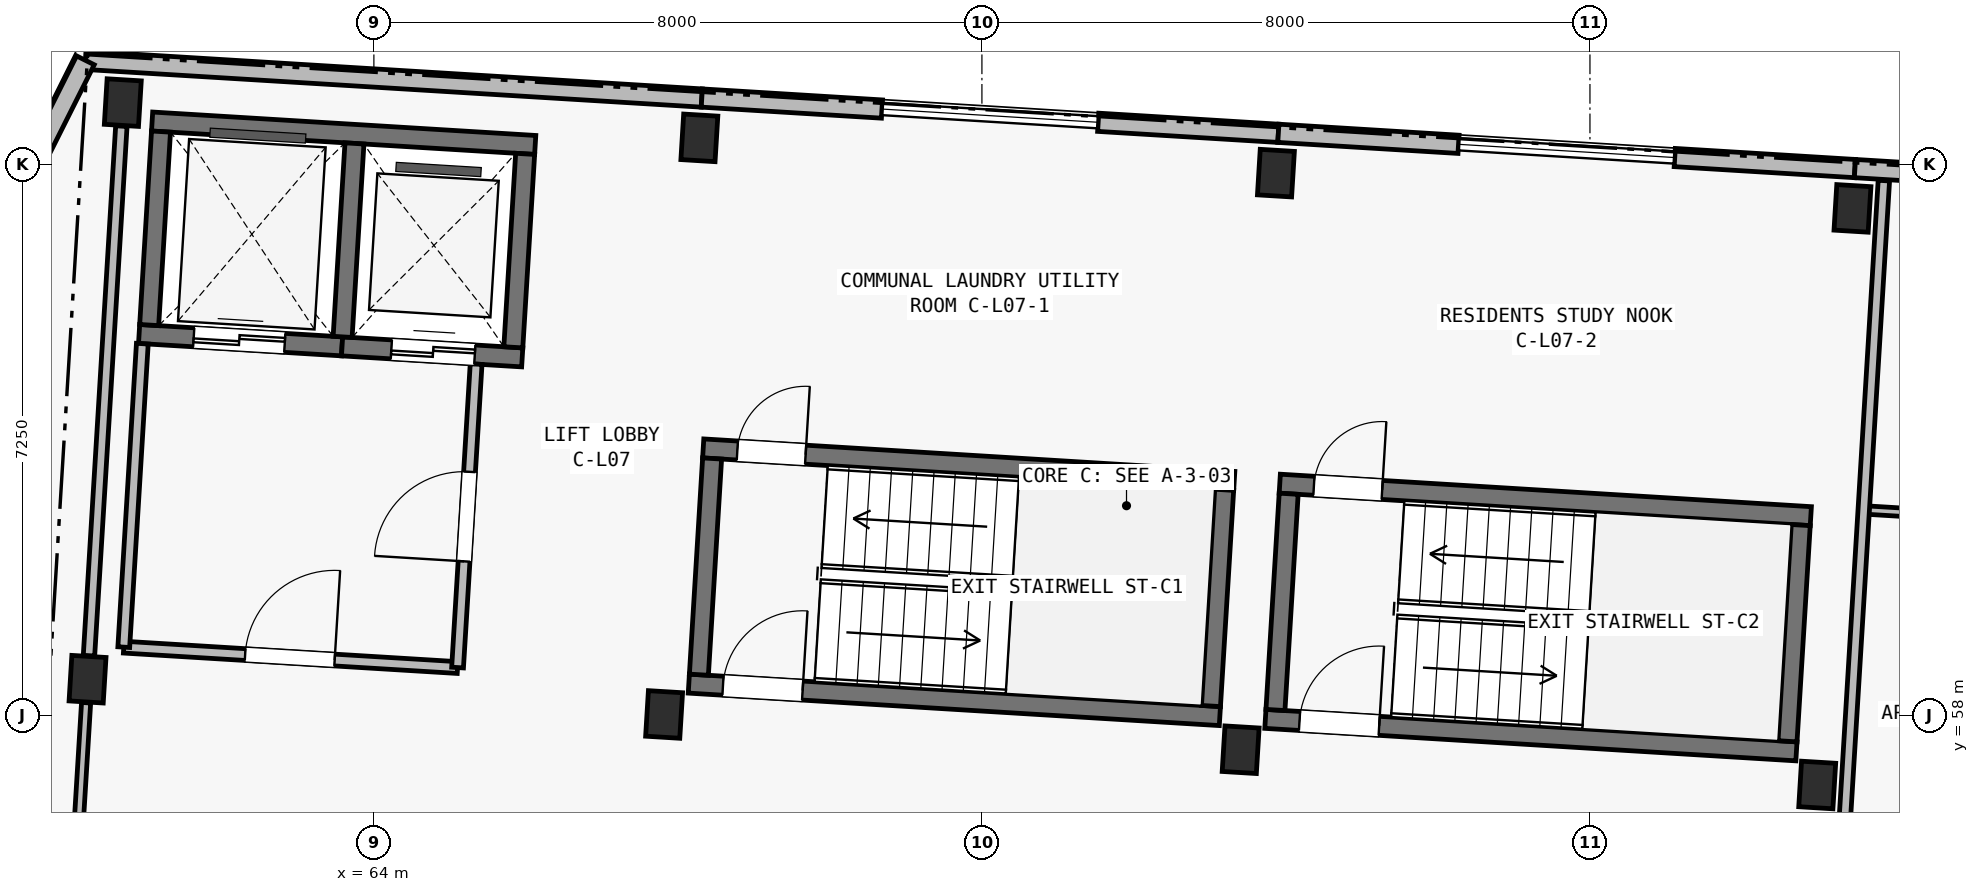
"""IFC4 building model, lengths in metres.
Left out: names, types, materials, properties, quantities, classifications, styles, units other than length and angle.
Written with IfcOpenShell. Run it as: python <this file> out.ifc"""

import sys

from ifc_helpers import new_model, si_unit, direction, frame, frame_2d, origin, origin_2d, place, context, subcontext, project, spatial, rectangle, extrude, element, fill, save


model = new_model("IFC4")
c1 = context("Model", 3, precision=1e-05, world=origin(), true_north=direction((0.0, 1.0)))
c2 = subcontext(c1, "Body", "Model", "MODEL_VIEW")
j1 = project(units=[si_unit("LENGTHUNIT", "METRE"), si_unit("PLANEANGLEUNIT", "RADIAN")], contexts=[c1])
p1 = place(None, origin())
s1 = spatial("IfcSite", under=j1, at=p1, CompositionType="ELEMENT")
p2 = place(p1, origin())
s2 = spatial("IfcBuilding", under=s1, at=p2, CompositionType="ELEMENT")
p3 = place(p2, frame((0.0, 0.0, 24.65)))
s3 = spatial("IfcBuildingStorey", under=s2, at=p3, CompositionType="ELEMENT", Elevation=24.65)
for number, where, z_axis, x_axis in (
    (1, (60.233, 58.478, 0.0), (0.0, 0.0, 1.0), (0.998, -0.061, 0.0)),
    (2, (60.697, 66.063, 0.0), (0.0, 0.0, 1.0), (0.998, -0.061, 0.0)),
    (3, (67.818, 58.014, 0.0), (0.0, 0.0, 1.0), (0.998, -0.061, 0.0)),
    (4, (68.282, 65.599, 0.0), (0.0, 0.0, 1.0), (0.998, -0.061, 0.0)),
    (5, (75.404, 57.55, 0.0), (0.0, 0.0, 1.0), (0.998, -0.061, 0.0)),
    (6, (75.868, 65.135, 0.0), (0.0, 0.0, 1.0), (0.998, -0.061, 0.0)),
    (7, (82.99, 57.086, 0.0), (0.0, 0.0, 1.0), (0.998, -0.061, 0.0)),
    (8, (83.454, 64.672, 0.0), (0.0, 0.0, 1.0), (0.998, -0.061, 0.0)),
):
    element("IfcColumn", number, at=place(p3, frame(where, z_axis=z_axis, x_axis=x_axis)), inside=s3, PredefinedType="COLUMN", context=c2, shape_type="SweptSolid", body=[
        extrude(rectangle(XDim=0.45, YDim=0.6, at=origin_2d()), origin(), (0.0, 0.0, 1.0), 3.25),
    ])
p4 = place(p3, frame((61.082, 65.814, 0.0), z_axis=(0.0, 0.0, 1.0), x_axis=(0.998134101522, -0.061059932685, 0.0)))
e9 = element("IfcWall", 9, at=p4, inside=s3, PredefinedType="SHEAR", context=c2, shape_type="SweptSolid", body=[
    extrude(rectangle(XDim=5.05, YDim=0.25, at=frame_2d((2.525, 0.0))), origin(), (0.0, 0.0, 1.0), 3.25),
])
p5 = place(p3, frame((60.911, 63.02, 0.0), z_axis=(0.0, 0.0, 1.0), x_axis=(0.998134099905, -0.061059959111, 0.0)))
e10 = element("IfcWall", 10, at=p5, inside=s3, PredefinedType="SHEAR", context=c2, shape_type="SweptSolid", body=[
    extrude(rectangle(XDim=2.675, YDim=0.25, at=frame_2d((1.337, 0.0))), origin(), (0.0, 0.0, 1.0), 3.25),
])
p6 = place(p5, frame((0.72, 0.0, 0.0)))
e11 = element("IfcOpeningElement", 11, at=p6, cuts=e10, PredefinedType="OPENING", context=c2, shape_type="SweptSolid", body=[
    extrude(rectangle(XDim=1.2, YDim=2.2, at=frame_2d((0.6, 1.1))), frame((0.0, 0.14, 0.0), z_axis=(0.0, -1.0, 0.0), x_axis=(1.0, 0.0, 0.0)), (0.0, 0.0, 1.0), 0.28),
])
p7 = place(p3, frame((63.581, 62.856, 0.0), z_axis=(0.0, 0.0, 1.0), x_axis=(0.998134103342, -0.061059902923, 0.0)))
e12 = element("IfcWall", 12, at=p7, inside=s3, PredefinedType="SHEAR", context=c2, shape_type="SweptSolid", body=[
    extrude(rectangle(XDim=2.375, YDim=0.25, at=frame_2d((1.188, 0.0))), origin(), (0.0, 0.0, 1.0), 3.25),
])
p8 = place(p7, frame((0.65, 0.0, 0.0)))
e13 = element("IfcOpeningElement", 13, at=p8, cuts=e12, PredefinedType="OPENING", context=c2, shape_type="SweptSolid", body=[
    extrude(rectangle(XDim=1.1, YDim=2.15, at=frame_2d((0.55, 1.075))), frame((0.0, 0.14, 0.0), z_axis=(0.0, -1.0, 0.0), x_axis=(1.0, 0.0, 0.0)), (0.0, 0.0, 1.0), 0.28),
])
p9 = place(p3, frame((61.043, 63.137, 0.0), z_axis=(0.0, 0.0, 1.0), x_axis=(0.061078919587, 0.998132939834, 0.0)))
e14 = element("IfcWall", 14, at=p9, inside=s3, PredefinedType="SHEAR", context=c2, shape_type="SweptSolid", body=[
    extrude(rectangle(XDim=2.55, YDim=0.25, at=frame_2d((1.275, 0.0))), origin(), (0.0, 0.0, 1.0), 3.25),
])
p10 = place(p3, frame((63.589, 62.981, 0.0), z_axis=(0.0, 0.0, 1.0), x_axis=(0.060989368901, 0.998138415692, 0.0)))
e15 = element("IfcWall", 15, at=p10, inside=s3, PredefinedType="SHEAR", context=c2, shape_type="SweptSolid", body=[
    extrude(rectangle(XDim=2.55, YDim=0.25, at=frame_2d((1.275, 0.0))), origin(), (0.0, 0.0, 1.0), 3.25),
])
p11 = place(p3, frame((65.834, 62.844, 0.0), z_axis=(0.0, 0.0, 1.0), x_axis=(0.061084756616, 0.998132582631, 0.0)))
e16 = element("IfcWall", 16, at=p11, inside=s3, PredefinedType="SHEAR", context=c2, shape_type="SweptSolid", body=[
    extrude(rectangle(XDim=2.55, YDim=0.25, at=frame_2d((1.275, 0.0))), origin(), (0.0, 0.0, 1.0), 3.25),
])
p12 = place(p3, frame((68.333, 61.514, 0.0), z_axis=(0.0, 0.0, 1.0), x_axis=(0.998135676081, -0.061034188237, 0.0)))
e17 = element("IfcWall", 17, at=p12, inside=s3, PredefinedType="SHEAR", context=c2, shape_type="SweptSolid", body=[
    extrude(rectangle(XDim=7.0, YDim=0.25, at=frame_2d((3.5, 0.0))), origin(), (0.0, 0.0, 1.0), 3.25),
])
p13 = place(p12, frame((0.45, 0.0, 0.0)))
e18 = element("IfcOpeningElement", 18, at=p13, cuts=e17, PredefinedType="OPENING", context=c2, shape_type="SweptSolid", body=[
    extrude(rectangle(XDim=0.9, YDim=2.1, at=frame_2d((0.45, 1.05))), frame((0.0, 0.14, 0.0), z_axis=(0.0, -1.0, 0.0), x_axis=(1.0, 0.0, 0.0)), (0.0, 0.0, 1.0), 0.28),
])
p14 = place(p3, frame((68.144, 58.419, 0.0), z_axis=(0.0, 0.0, 1.0), x_axis=(0.998135546153, -0.061036313012, 0.0)))
e19 = element("IfcWall", 19, at=p14, inside=s3, PredefinedType="SHEAR", context=c2, shape_type="SweptSolid", body=[
    extrude(rectangle(XDim=7.0, YDim=0.25, at=frame_2d((3.5, 0.0))), origin(), (0.0, 0.0, 1.0), 3.25),
])
p15 = place(p14, frame((0.45, 0.0, 0.0)))
e20 = element("IfcOpeningElement", 20, at=p15, cuts=e19, PredefinedType="OPENING", context=c2, shape_type="SweptSolid", body=[
    extrude(rectangle(XDim=1.05, YDim=2.15, at=frame_2d((0.525, 1.075))), frame((0.0, 0.14, 0.0), z_axis=(0.0, -1.0, 0.0), x_axis=(1.0, 0.0, 0.0)), (0.0, 0.0, 1.0), 0.28),
])
for number, where, z_axis, x_axis in (
    (21, (68.276, 58.537, 0.0), (0.0, 0.0, 1.0), (0.061, 0.998, 0.0)),
    (22, (75.014, 58.125, 0.0), (0.0, 0.0, 1.0), (0.061, 0.998, 0.0)),
):
    element("IfcWall", number, at=place(p3, frame(where, z_axis=z_axis, x_axis=x_axis)), inside=s3, PredefinedType="SHEAR", context=c2, shape_type="SweptSolid", body=[
        extrude(rectangle(XDim=2.85, YDim=0.25, at=frame_2d((1.425, 0.0))), origin(), (0.0, 0.0, 1.0), 3.25),
    ])
p16 = place(p3, frame((75.919, 61.05, 0.0), z_axis=(0.0, 0.0, 1.0), x_axis=(0.998135546153, -0.061036313012, 0.0)))
e23 = element("IfcWall", 23, at=p16, inside=s3, PredefinedType="SHEAR", context=c2, shape_type="SweptSolid", body=[
    extrude(rectangle(XDim=7.0, YDim=0.25, at=frame_2d((3.5, 0.0))), origin(), (0.0, 0.0, 1.0), 3.25),
])
p17 = place(p16, frame((0.45, 0.0, 0.0)))
e24 = element("IfcOpeningElement", 24, at=p17, cuts=e23, PredefinedType="OPENING", context=c2, shape_type="SweptSolid", body=[
    extrude(rectangle(XDim=0.9, YDim=2.1, at=frame_2d((0.45, 1.05))), frame((0.0, 0.14, 0.0), z_axis=(0.0, -1.0, 0.0), x_axis=(1.0, 0.0, 0.0)), (0.0, 0.0, 1.0), 0.28),
])
p18 = place(p3, frame((75.73, 57.956, 0.0), z_axis=(0.0, 0.0, 1.0), x_axis=(0.998135546153, -0.061036313012, 0.0)))
e25 = element("IfcWall", 25, at=p18, inside=s3, PredefinedType="SHEAR", context=c2, shape_type="SweptSolid", body=[
    extrude(rectangle(XDim=7.0, YDim=0.25, at=frame_2d((3.5, 0.0))), origin(), (0.0, 0.0, 1.0), 3.25),
])
p19 = place(p18, frame((0.45, 0.0, 0.0)))
e26 = element("IfcOpeningElement", 26, at=p19, cuts=e25, PredefinedType="OPENING", context=c2, shape_type="SweptSolid", body=[
    extrude(rectangle(XDim=1.05, YDim=2.15, at=frame_2d((0.525, 1.075))), frame((0.0, 0.14, 0.0), z_axis=(0.0, -1.0, 0.0), x_axis=(1.0, 0.0, 0.0)), (0.0, 0.0, 1.0), 0.28),
])
for number, where, z_axis, x_axis in (
    (27, (75.862, 58.073, 0.0), (0.0, 0.0, 1.0), (0.061, 0.998, 0.0)),
    (28, (82.599, 57.661, 0.0), (0.0, 0.0, 1.0), (0.061, 0.998, 0.0)),
):
    element("IfcWall", number, at=place(p3, frame(where, z_axis=z_axis, x_axis=x_axis)), inside=s3, PredefinedType="SHEAR", context=c2, shape_type="SweptSolid", body=[
        extrude(rectangle(XDim=2.85, YDim=0.25, at=frame_2d((1.425, 0.0))), origin(), (0.0, 0.0, 1.0), 3.25),
    ])
p20 = place(p3, frame((60.205, 66.62, 0.0), z_axis=(0.0, 0.0, 1.0), x_axis=(0.998134248939, -0.061057522844, 0.0)))
e29 = element("IfcWall", 29, at=p20, inside=s3, PredefinedType="SOLIDWALL", context=c2, shape_type="SweptSolid", body=[
    extrude(rectangle(XDim=8.125, YDim=0.24, at=frame_2d((4.062, 0.0))), origin(), (0.0, 0.0, 1.0), 3.0),
])
p21 = place(p3, frame((68.314, 66.124, 0.0), z_axis=(0.0, 0.0, 1.0), x_axis=(0.998134103342, -0.061059902923, 0.0)))
e30 = element("IfcWall", 30, at=p21, inside=s3, PredefinedType="SOLIDWALL", context=c2, shape_type="SweptSolid", body=[
    extrude(rectangle(XDim=2.375, YDim=0.24, at=frame_2d((1.188, 0.0))), origin(), (0.0, 0.0, 1.0), 3.0),
])
p22 = place(p3, frame((73.53, 65.804, 0.0), z_axis=(0.0, 0.0, 1.0), x_axis=(0.998133720034, -0.061066168473, 0.0)))
e31 = element("IfcWall", 31, at=p22, inside=s3, PredefinedType="SOLIDWALL", context=c2, shape_type="SweptSolid", body=[
    extrude(rectangle(XDim=2.375, YDim=0.24, at=frame_2d((1.188, 0.0))), origin(), (0.0, 0.0, 1.0), 3.0),
])
for number, where, z_axis, x_axis in (
    (32, (75.9, 65.659, 0.0), (0.0, 0.0, 1.0), (0.998, -0.061, 0.0)),
    (33, (81.115, 65.341, 0.0), (0.0, 0.0, 1.0), (0.998, -0.061, 0.0)),
):
    element("IfcWall", number, at=place(p3, frame(where, z_axis=z_axis, x_axis=x_axis)), inside=s3, PredefinedType="SOLIDWALL", context=c2, shape_type="SweptSolid", body=[
        extrude(rectangle(XDim=2.375, YDim=0.24, at=frame_2d((1.188, 0.0))), origin(), (0.0, 0.0, 1.0), 3.0),
    ])
p23 = place(p3, frame((83.486, 65.196, 0.0), z_axis=(0.0, 0.0, 1.0), x_axis=(0.998135669243, -0.061034300063, 0.0)))
e34 = element("IfcWall", 34, at=p23, inside=s3, PredefinedType="SOLIDWALL", context=c2, shape_type="SweptSolid", body=[
    extrude(rectangle(XDim=7.6, YDim=0.24, at=frame_2d((3.8, 0.0))), origin(), (0.0, 0.0, 1.0), 3.0),
])
p24 = place(p23, frame((1.424, 0.0, 0.44)))
e35 = element("IfcOpeningElement", 35, at=p24, cuts=e34, PredefinedType="OPENING", context=c2, shape_type="SweptSolid", body=[
    extrude(rectangle(XDim=0.64, YDim=2.18, at=frame_2d((0.32, 1.09))), frame((0.0, 0.135, 0.0), z_axis=(0.0, -1.0, 0.0), x_axis=(1.0, 0.0, 0.0)), (0.0, 0.0, 1.0), 0.27),
])
p25 = place(p23, frame((5.935, 0.0, 0.5)))
e36 = element("IfcOpeningElement", 36, at=p25, cuts=e34, PredefinedType="OPENING", context=c2, shape_type="SweptSolid", body=[
    extrude(rectangle(XDim=0.72, YDim=2.16, at=frame_2d((0.36, 1.08))), frame((0.0, 0.135, 0.0), z_axis=(0.0, -1.0, 0.0), x_axis=(1.0, 0.0, 0.0)), (0.0, 0.0, 1.0), 0.27),
])
p26 = place(p3, frame((51.654, 49.585, 0.0), z_axis=(0.0, 0.0, 1.0), x_axis=(0.448621989068, 0.893721607059, 0.0)))
e37 = element("IfcWall", 37, at=p26, inside=s3, PredefinedType="SOLIDWALL", context=c2, shape_type="SweptSolid", body=[
    extrude(rectangle(XDim=19.061, YDim=0.26, at=frame_2d((9.53, 0.0))), origin(), (0.0, 0.0, 1.0), 3.0),
])
p27 = place(p26, frame((2.99, 0.0, 0.52)))
e38 = element("IfcOpeningElement", 38, at=p27, cuts=e37, PredefinedType="OPENING", context=c2, shape_type="SweptSolid", body=[
    extrude(rectangle(XDim=0.64, YDim=2.18, at=frame_2d((0.32, 1.09))), frame((0.0, 0.145, 0.0), z_axis=(0.0, -1.0, 0.0), x_axis=(1.0, 0.0, 0.0)), (0.0, 0.0, 1.0), 0.29),
])
p28 = place(p26, frame((15.65, 0.0, 0.45)))
e39 = element("IfcOpeningElement", 39, at=p28, cuts=e37, PredefinedType="OPENING", context=c2, shape_type="SweptSolid", body=[
    extrude(rectangle(XDim=0.78, YDim=2.2, at=frame_2d((0.39, 1.1))), frame((0.0, 0.145, 0.0), z_axis=(0.0, -1.0, 0.0), x_axis=(1.0, 0.0, 0.0)), (0.0, 0.0, 1.0), 0.29),
])
p29 = place(p3, frame((60.709, 58.899, 0.0), z_axis=(0.0, 0.0, 1.0), x_axis=(0.998132276607, -0.061089756882, 0.0)))
e40 = element("IfcWall", 40, at=p29, inside=s3, PredefinedType="PARTITIONING", context=c2, shape_type="SweptSolid", body=[
    extrude(rectangle(XDim=4.4, YDim=0.155, at=frame_2d((2.2, 0.0))), origin(), (0.0, 0.0, 1.0), 2.97),
])
p30 = place(p29, frame((1.6, 0.0, 0.0)))
e41 = element("IfcOpeningElement", 41, at=p30, cuts=e40, PredefinedType="OPENING", context=c2, shape_type="SweptSolid", body=[
    extrude(rectangle(XDim=1.18, YDim=2.15, at=frame_2d((0.59, 1.075))), frame((0.0, 0.093, 0.0), z_axis=(0.0, -1.0, 0.0), x_axis=(1.0, 0.0, 0.0)), (0.0, 0.0, 1.0), 0.185),
])
p31 = place(p3, frame((60.709, 58.899, 0.0), z_axis=(0.0, 0.0, 1.0), x_axis=(0.061036844229, 0.998135513669, 0.0)))
e42 = element("IfcWall", 42, at=p31, inside=s3, PredefinedType="PARTITIONING", context=c2, shape_type="SweptSolid", body=[
    extrude(rectangle(XDim=4.0, YDim=0.155, at=frame_2d((2.0, 0.0))), origin(), (0.0, 0.0, 1.0), 2.97),
])
p32 = place(p3, frame((65.101, 58.631, 0.0), z_axis=(0.0, 0.0, 1.0), x_axis=(0.061033125904, 0.99813574104, 0.0)))
e43 = element("IfcWall", 43, at=p32, inside=s3, PredefinedType="PARTITIONING", context=c2, shape_type="SweptSolid", body=[
    extrude(rectangle(XDim=4.0, YDim=0.155, at=frame_2d((2.0, 0.0))), origin(), (0.0, 0.0, 1.0), 2.97),
])
p33 = place(p32, frame((1.4, 0.0, 0.0)))
e44 = element("IfcOpeningElement", 44, at=p33, cuts=e43, PredefinedType="OPENING", context=c2, shape_type="SweptSolid", body=[
    extrude(rectangle(XDim=1.18, YDim=2.15, at=frame_2d((0.59, 1.075))), frame((0.0, 0.093, 0.0), z_axis=(0.0, -1.0, 0.0), x_axis=(1.0, 0.0, 0.0)), (0.0, 0.0, 1.0), 0.185),
])
p34 = place(p3, frame((59.983, 54.395, 0.0), z_axis=(0.0, 0.0, 1.0), x_axis=(0.061035211258, 0.998135613525, 0.0)))
e45 = element("IfcWall", 45, at=p34, inside=s3, PredefinedType="PARTITIONING", context=c2, shape_type="SweptSolid", body=[
    extrude(rectangle(XDim=3.78, YDim=0.12, at=frame_2d((1.89, 0.0))), origin(), (0.0, 0.0, 1.0), 2.5),
])
p35 = place(p34, frame((1.35, 0.0, 0.0)))
e46 = element("IfcOpeningElement", 46, at=p35, cuts=e45, PredefinedType="OPENING", context=c2, shape_type="SweptSolid", body=[
    extrude(rectangle(XDim=0.9, YDim=2.1, at=frame_2d((0.45, 1.05))), frame((0.0, 0.075, 0.0), z_axis=(0.0, -1.0, 0.0), x_axis=(1.0, 0.0, 0.0)), (0.0, 0.0, 1.0), 0.15),
])
p36 = place(p3, frame((60.251, 58.787, 0.0), z_axis=(0.0, 0.0, 1.0), x_axis=(0.061071659957, 0.998133384047, 0.0)))
e47 = element("IfcWall", 47, at=p36, inside=s3, PredefinedType="PARTITIONING", context=c2, shape_type="SweptSolid", body=[
    extrude(rectangle(XDim=6.98, YDim=0.15, at=frame_2d((3.49, 0.0))), origin(), (0.0, 0.0, 1.0), 2.5),
])
p37 = place(p3, frame((83.602, 60.705, 0.0), z_axis=(0.0, 0.0, 1.0), x_axis=(0.998133617109, -0.061067850767, 0.0)))
e48 = element("IfcWall", 48, at=p37, inside=s3, PredefinedType="PARTITIONING", context=c2, shape_type="SweptSolid", body=[
    extrude(rectangle(XDim=3.41, YDim=0.11, at=frame_2d((1.705, 0.0))), origin(), (0.0, 0.0, 1.0), 2.97),
])
p38 = place(p37, frame((1.255, 0.0, 0.0)))
e49 = element("IfcOpeningElement", 49, at=p38, cuts=e48, PredefinedType="OPENING", context=c2, shape_type="SweptSolid", body=[
    extrude(rectangle(XDim=0.9, YDim=2.1, at=frame_2d((0.45, 1.05))), frame((0.0, 0.07, 0.0), z_axis=(0.0, -1.0, 0.0), x_axis=(1.0, 0.0, 0.0)), (0.0, 0.0, 1.0), 0.14),
])
p39 = place(p3, frame((83.265, 55.185, 0.0), z_axis=(0.0, 0.0, 1.0), x_axis=(0.061046193261, 0.998134941923, 0.0)))
e50 = element("IfcWall", 50, at=p39, inside=s3, PredefinedType="PARTITIONING", context=c2, shape_type="SweptSolid", body=[
    extrude(rectangle(XDim=9.87, YDim=0.15, at=frame_2d((4.935, 0.0))), origin(), (0.0, 0.0, 1.0), 2.97),
])
p40 = place(p30, origin())
e51 = element("IfcDoor", 51, at=p40, inside=s3, OperationType="SINGLE_SWING_RIGHT", PredefinedType="DOOR", context=c2, shape_type="SweptSolid", body=[
    extrude(rectangle(XDim=1.18, YDim=2.15, at=frame_2d((0.59, 1.075))), frame((0.0, 0.025, 0.0), z_axis=(0.0, -1.0, 0.0), x_axis=(1.0, 0.0, 0.0)), (0.0, 0.0, 1.0), 0.05),
])
fill(e41, e51)
p41 = place(p33, origin())
e52 = element("IfcDoor", 52, at=p41, inside=s3, OperationType="SINGLE_SWING_LEFT", PredefinedType="DOOR", context=c2, shape_type="SweptSolid", body=[
    extrude(rectangle(XDim=1.18, YDim=2.15, at=frame_2d((0.59, 1.075))), frame((0.0, 0.025, 0.0), z_axis=(0.0, -1.0, 0.0), x_axis=(1.0, 0.0, 0.0)), (0.0, 0.0, 1.0), 0.05),
])
fill(e44, e52)
p42 = place(p15, origin())
e53 = element("IfcDoor", 53, at=p42, inside=s3, OperationType="SINGLE_SWING_RIGHT", PredefinedType="DOOR", context=c2, shape_type="SweptSolid", body=[
    extrude(rectangle(XDim=1.05, YDim=2.15, at=frame_2d((0.525, 1.075))), frame((0.0, 0.025, 0.0), z_axis=(0.0, -1.0, 0.0), x_axis=(1.0, 0.0, 0.0)), (0.0, 0.0, 1.0), 0.05),
])
fill(e20, e53)
p43 = place(p13, origin())
e54 = element("IfcDoor", 54, at=p43, inside=s3, OperationType="SINGLE_SWING_RIGHT", PredefinedType="DOOR", context=c2, shape_type="SweptSolid", body=[
    extrude(rectangle(XDim=0.9, YDim=2.1, at=frame_2d((0.45, 1.05))), frame((0.0, 0.025, 0.0), z_axis=(0.0, -1.0, 0.0), x_axis=(1.0, 0.0, 0.0)), (0.0, 0.0, 1.0), 0.05),
])
fill(e18, e54)
p44 = place(p19, origin())
e55 = element("IfcDoor", 55, at=p44, inside=s3, OperationType="SINGLE_SWING_RIGHT", PredefinedType="DOOR", context=c2, shape_type="SweptSolid", body=[
    extrude(rectangle(XDim=1.05, YDim=2.15, at=frame_2d((0.525, 1.075))), frame((0.0, 0.025, 0.0), z_axis=(0.0, -1.0, 0.0), x_axis=(1.0, 0.0, 0.0)), (0.0, 0.0, 1.0), 0.05),
])
fill(e26, e55)
p45 = place(p17, origin())
e56 = element("IfcDoor", 56, at=p45, inside=s3, OperationType="SINGLE_SWING_RIGHT", PredefinedType="DOOR", context=c2, shape_type="SweptSolid", body=[
    extrude(rectangle(XDim=0.9, YDim=2.1, at=frame_2d((0.45, 1.05))), frame((0.0, 0.025, 0.0), z_axis=(0.0, -1.0, 0.0), x_axis=(1.0, 0.0, 0.0)), (0.0, 0.0, 1.0), 0.05),
])
fill(e24, e56)
p46 = place(p6, origin())
e57 = element("IfcDoor", 57, at=p46, inside=s3, OperationType="DOUBLE_DOOR_SLIDING", PredefinedType="DOOR", context=c2, shape_type="SweptSolid", body=[
    extrude(rectangle(XDim=1.2, YDim=2.2, at=frame_2d((0.6, 1.1))), frame((0.0, 0.025, 0.0), z_axis=(0.0, -1.0, 0.0), x_axis=(1.0, 0.0, 0.0)), (0.0, 0.0, 1.0), 0.05),
])
fill(e11, e57)
p47 = place(p8, origin())
e58 = element("IfcDoor", 58, at=p47, inside=s3, OperationType="DOUBLE_DOOR_SLIDING", PredefinedType="DOOR", context=c2, shape_type="SweptSolid", body=[
    extrude(rectangle(XDim=1.1, YDim=2.15, at=frame_2d((0.55, 1.075))), frame((0.0, 0.025, 0.0), z_axis=(0.0, -1.0, 0.0), x_axis=(1.0, 0.0, 0.0)), (0.0, 0.0, 1.0), 0.05),
])
fill(e13, e58)
save(model, sys.argv[1])
